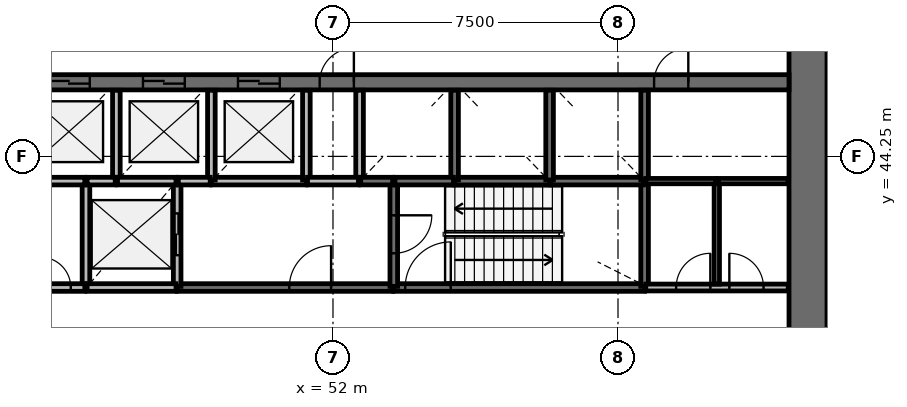
"""IFC4 building model, lengths in metres.
Left out: names, types, materials, properties, quantities, classifications, styles, units other than length and angle.
Written with IfcOpenShell. Run it as: python <this file> out.ifc"""

import sys

from ifc_helpers import new_model, si_unit, direction, frame, frame_2d, origin, place, context, subcontext, project, spatial, rectangle, extrude, source, transform, mapped, element, fill, save


model = new_model("IFC4")
c1 = context("Model", 3, precision=1e-05, world=origin(), true_north=direction((0.0, 1.0)))
c2 = subcontext(c1, "Body", "Model", "MODEL_VIEW")
j1 = project(units=[si_unit("LENGTHUNIT", "METRE"), si_unit("PLANEANGLEUNIT", "RADIAN")], contexts=[c1])
p1 = place(None, origin())
s1 = spatial("IfcSite", under=j1, at=p1, CompositionType="ELEMENT")
p2 = place(p1, origin())
s2 = spatial("IfcBuilding", under=s1, at=p2, CompositionType="ELEMENT")
p3 = place(p2, frame((0.0, 0.0, 9.4)))
s3 = spatial("IfcBuildingStorey", under=s2, at=p3, CompositionType="ELEMENT", Elevation=9.4)
p4 = place(p3, frame((64.5, 38.0, 0.0), z_axis=(0.0, 0.0, 1.0), x_axis=(0.0, 1.0, 0.0)))
e1 = element("IfcWall", 1, at=p4, inside=s3, PredefinedType="SHEAR", context=c2, shape_type="SweptSolid", body=[
    extrude(rectangle(XDim=20.0, YDim=1.0, at=frame_2d((10.0, 0.0))), origin(), (0.0, 0.0, 1.0), 4.4),
])
p5 = place(p4, frame((9.1, 0.0, 0.0)))
e2 = element("IfcOpeningElement", 2, at=p5, cuts=e1, PredefinedType="OPENING", context=c2, shape_type="SweptSolid", body=[
    extrude(rectangle(XDim=1.8, YDim=2.1, at=frame_2d((0.9, 1.05))), frame((0.0, 0.51, 0.0), z_axis=(0.0, -1.0, 0.0), x_axis=(1.0, 0.0, 0.0)), (0.0, 0.0, 1.0), 1.02),
])
p6 = place(p3, frame((40.0, 46.2, 0.0), z_axis=(0.0, 0.0, 1.0), x_axis=(1.0, 0.0, 0.0)))
e3 = element("IfcWall", 3, at=p6, inside=s3, PredefinedType="SHEAR", context=c2, shape_type="SweptSolid", body=[
    extrude(rectangle(XDim=24.0, YDim=0.4, at=frame_2d((12.0, 0.0))), origin(), (0.0, 0.0, 1.0), 4.4),
])
p7 = place(p6, frame((4.5, 0.0, 0.0)))
e4 = element("IfcOpeningElement", 4, at=p7, cuts=e3, PredefinedType="OPENING", context=c2, shape_type="SweptSolid", body=[
    extrude(rectangle(XDim=1.1, YDim=2.1, at=frame_2d((0.55, 1.05))), frame((0.0, 0.21, 0.0), z_axis=(0.0, -1.0, 0.0), x_axis=(1.0, 0.0, 0.0)), (0.0, 0.0, 1.0), 0.42),
])
p8 = place(p6, frame((7.0, 0.0, 0.0)))
e5 = element("IfcOpeningElement", 5, at=p8, cuts=e3, PredefinedType="OPENING", context=c2, shape_type="SweptSolid", body=[
    extrude(rectangle(XDim=1.1, YDim=2.1, at=frame_2d((0.55, 1.05))), frame((0.0, 0.21, 0.0), z_axis=(0.0, -1.0, 0.0), x_axis=(1.0, 0.0, 0.0)), (0.0, 0.0, 1.0), 0.42),
])
p9 = place(p6, frame((9.5, 0.0, 0.0)))
e6 = element("IfcOpeningElement", 6, at=p9, cuts=e3, PredefinedType="OPENING", context=c2, shape_type="SweptSolid", body=[
    extrude(rectangle(XDim=1.1, YDim=2.1, at=frame_2d((0.55, 1.05))), frame((0.0, 0.21, 0.0), z_axis=(0.0, -1.0, 0.0), x_axis=(1.0, 0.0, 0.0)), (0.0, 0.0, 1.0), 0.42),
])
p10 = place(p6, frame((20.45, 0.0, 0.0)))
e7 = element("IfcOpeningElement", 7, at=p10, cuts=e3, PredefinedType="OPENING", context=c2, shape_type="SweptSolid", body=[
    extrude(rectangle(XDim=0.9, YDim=2.1, at=frame_2d((0.45, 1.05))), frame((0.0, 0.21, 0.0), z_axis=(0.0, -1.0, 0.0), x_axis=(1.0, 0.0, 0.0)), (0.0, 0.0, 1.0), 0.42),
])
p11 = place(p6, frame((2.65, 0.0, 0.0)))
e8 = element("IfcOpeningElement", 8, at=p11, cuts=e3, PredefinedType="OPENING", context=c2, shape_type="SweptSolid", body=[
    extrude(rectangle(XDim=0.9, YDim=2.1, at=frame_2d((0.45, 1.05))), frame((0.0, 0.21, 0.0), z_axis=(0.0, -1.0, 0.0), x_axis=(1.0, 0.0, 0.0)), (0.0, 0.0, 1.0), 0.42),
])
p12 = place(p6, frame((11.65, 0.0, 0.0)))
e9 = element("IfcOpeningElement", 9, at=p12, cuts=e3, PredefinedType="OPENING", context=c2, shape_type="SweptSolid", body=[
    extrude(rectangle(XDim=0.9, YDim=2.1, at=frame_2d((0.45, 1.05))), frame((0.0, 0.21, 0.0), z_axis=(0.0, -1.0, 0.0), x_axis=(1.0, 0.0, 0.0)), (0.0, 0.0, 1.0), 0.42),
])
p13 = place(p3, frame((53.6, 40.8, 0.0), z_axis=(0.0, 0.0, 1.0), x_axis=(1.0, 0.0, 0.0)))
e10 = element("IfcWall", 10, at=p13, inside=s3, PredefinedType="SOLIDWALL", context=c2, shape_type="SweptSolid", body=[
    extrude(rectangle(XDim=6.6, YDim=0.2, at=frame_2d((3.3, 0.0))), origin(), (0.0, 0.0, 1.0), 3.95),
])
p14 = place(p13, frame((0.3, 0.0, 0.0)))
e11 = element("IfcOpeningElement", 11, at=p14, cuts=e10, PredefinedType="OPENING", context=c2, shape_type="SweptSolid", body=[
    extrude(rectangle(XDim=1.2, YDim=2.1, at=frame_2d((0.6, 1.05))), frame((0.0, 0.11, 0.0), z_axis=(0.0, -1.0, 0.0), x_axis=(1.0, 0.0, 0.0)), (0.0, 0.0, 1.0), 0.22),
])
p15 = place(p3, frame((47.9, 40.8, 0.0), z_axis=(0.0, 0.0, 1.0), x_axis=(1.0, 0.0, 0.0)))
e12 = element("IfcWall", 12, at=p15, inside=s3, PredefinedType="SOLIDWALL", context=c2, shape_type="SweptSolid", body=[
    extrude(rectangle(XDim=5.67, YDim=0.2, at=frame_2d((2.835, 0.0))), origin(), (0.0, 0.0, 1.0), 3.95),
])
p16 = place(p15, frame((2.95, 0.0, 0.0)))
e13 = element("IfcOpeningElement", 13, at=p16, cuts=e12, PredefinedType="OPENING", context=c2, shape_type="SweptSolid", body=[
    extrude(rectangle(XDim=1.1, YDim=2.1, at=frame_2d((0.55, 1.05))), frame((0.0, 0.11, 0.0), z_axis=(0.0, -1.0, 0.0), x_axis=(1.0, 0.0, 0.0)), (0.0, 0.0, 1.0), 0.22),
])
p17 = place(p3, frame((45.5, 43.6, 0.0), z_axis=(0.0, 0.0, 1.0), x_axis=(0.0, -1.0, 0.0)))
e14 = element("IfcWall", 14, at=p17, inside=s3, PredefinedType="SOLIDWALL", context=c2, shape_type="SweptSolid", body=[
    extrude(rectangle(XDim=2.8, YDim=0.2, at=frame_2d((1.4, 0.0))), origin(), (0.0, 0.0, 1.0), 3.95),
])
p18 = place(p3, frame((47.9, 40.83, 0.0), z_axis=(0.0, 0.0, 1.0), x_axis=(0.0, 1.0, 0.0)))
e15 = element("IfcWall", 15, at=p18, inside=s3, PredefinedType="SOLIDWALL", context=c2, shape_type="SweptSolid", body=[
    extrude(rectangle(XDim=2.77, YDim=0.2, at=frame_2d((1.385, 0.0))), origin(), (0.0, 0.0, 1.0), 3.95),
])
p19 = place(p18, frame((0.82, 0.0, 0.0)))
e16 = element("IfcOpeningElement", 16, at=p19, cuts=e15, PredefinedType="OPENING", context=c2, shape_type="SweptSolid", body=[
    extrude(rectangle(XDim=1.1, YDim=2.1, at=frame_2d((0.55, 1.05))), frame((0.0, 0.11, 0.0), z_axis=(0.0, -1.0, 0.0), x_axis=(1.0, 0.0, 0.0)), (0.0, 0.0, 1.0), 0.22),
])
p20 = place(p3, frame((60.2, 40.83, 0.0), z_axis=(0.0, 0.0, 1.0), x_axis=(0.0, 1.0, 0.0)))
e17 = element("IfcWall", 17, at=p20, inside=s3, PredefinedType="SOLIDWALL", context=c2, shape_type="SweptSolid", body=[
    extrude(rectangle(XDim=2.77, YDim=0.2, at=frame_2d((1.385, 0.0))), origin(), (0.0, 0.0, 1.0), 3.95),
])
p21 = place(p3, frame((53.6, 43.6, 0.0), z_axis=(0.0, 0.0, 1.0), x_axis=(0.0, -1.0, 0.0)))
e18 = element("IfcWall", 18, at=p21, inside=s3, PredefinedType="SOLIDWALL", context=c2, shape_type="SweptSolid", body=[
    extrude(rectangle(XDim=2.77, YDim=0.2, at=frame_2d((1.385, 0.0))), origin(), (0.0, 0.0, 1.0), 3.95),
])
p22 = place(p21, frame((0.9, 0.0, 0.0)))
e19 = element("IfcOpeningElement", 19, at=p22, cuts=e18, PredefinedType="OPENING", context=c2, shape_type="SweptSolid", body=[
    extrude(rectangle(XDim=1.0, YDim=2.1, at=frame_2d((0.5, 1.05))), frame((0.0, 0.11, 0.0), z_axis=(0.0, -1.0, 0.0), x_axis=(1.0, 0.0, 0.0)), (0.0, 0.0, 1.0), 0.22),
])
for number, where, z_axis, x_axis in (
    (20, (48.8, 43.6, 0.0), (0.0, 0.0, 1.0), (1.0, 0.0, 0.0)),
    (21, (55.2, 43.6, 0.0), (0.0, 0.0, 1.0), (1.0, 0.0, 0.0)),
):
    element("IfcWall", number, at=place(p3, frame(where, z_axis=z_axis, x_axis=x_axis)), inside=s3, PredefinedType="SOLIDWALL", context=c2, shape_type="SweptSolid", body=[
        extrude(rectangle(XDim=2.5, YDim=0.2, at=frame_2d((1.25, 0.0))), origin(), (0.0, 0.0, 1.0), 3.95),
    ])
p23 = place(p3, frame((57.73, 43.6, 0.0), z_axis=(0.0, 0.0, 1.0), x_axis=(1.0, 0.0, 0.0)))
e22 = element("IfcWall", 22, at=p23, inside=s3, PredefinedType="SOLIDWALL", context=c2, shape_type="SweptSolid", body=[
    extrude(rectangle(XDim=2.44, YDim=0.2, at=frame_2d((1.22, 0.0))), origin(), (0.0, 0.0, 1.0), 3.95),
])
p24 = place(p3, frame((45.53, 40.8, 0.0), z_axis=(0.0, 0.0, 1.0), x_axis=(1.0, 0.0, 0.0)))
e23 = element("IfcWall", 23, at=p24, inside=s3, PredefinedType="SOLIDWALL", context=c2, shape_type="SweptSolid", body=[
    extrude(rectangle(XDim=2.34, YDim=0.2, at=frame_2d((1.17, 0.0))), origin(), (0.0, 0.0, 1.0), 3.95),
])
p25 = place(p3, frame((46.3, 43.6, 0.0), z_axis=(0.0, 0.0, 1.0), x_axis=(0.0, 1.0, 0.0)))
e24 = element("IfcWall", 24, at=p25, inside=s3, PredefinedType="SOLIDWALL", context=c2, shape_type="SweptSolid", body=[
    extrude(rectangle(XDim=2.39, YDim=0.2, at=frame_2d((1.195, 0.0))), origin(), (0.0, 0.0, 1.0), 3.95),
])
for number, where, z_axis, x_axis in (
    (25, (48.8, 43.63, 0.0), (0.0, 0.0, 1.0), (0.0, 1.0, 0.0)),
    (26, (51.3, 43.63, 0.0), (0.0, 0.0, 1.0), (0.0, 1.0, 0.0)),
):
    element("IfcWall", number, at=place(p3, frame(where, z_axis=z_axis, x_axis=x_axis)), inside=s3, PredefinedType="SOLIDWALL", context=c2, shape_type="SweptSolid", body=[
        extrude(rectangle(XDim=2.36, YDim=0.2, at=frame_2d((1.18, 0.0))), origin(), (0.0, 0.0, 1.0), 3.95),
    ])
p26 = place(p3, frame((52.7, 45.99, 0.0), z_axis=(0.0, 0.0, 1.0), x_axis=(0.0, -1.0, 0.0)))
e27 = element("IfcWall", 27, at=p26, inside=s3, PredefinedType="SOLIDWALL", context=c2, shape_type="SweptSolid", body=[
    extrude(rectangle(XDim=2.39, YDim=0.2, at=frame_2d((1.195, 0.0))), origin(), (0.0, 0.0, 1.0), 3.95),
])
for number, where, z_axis, x_axis in (
    (28, (55.2, 43.63, 0.0), (0.0, 0.0, 1.0), (0.0, 1.0, 0.0)),
    (29, (57.7, 43.63, 0.0), (0.0, 0.0, 1.0), (0.0, 1.0, 0.0)),
    (30, (60.2, 43.63, 0.0), (0.0, 0.0, 1.0), (0.0, 1.0, 0.0)),
):
    element("IfcWall", number, at=place(p3, frame(where, z_axis=z_axis, x_axis=x_axis)), inside=s3, PredefinedType="SOLIDWALL", context=c2, shape_type="SweptSolid", body=[
        extrude(rectangle(XDim=2.36, YDim=0.2, at=frame_2d((1.18, 0.0))), origin(), (0.0, 0.0, 1.0), 3.95),
    ])
p27 = place(p3, frame((43.83, 43.6, 0.0), z_axis=(0.0, 0.0, 1.0), x_axis=(1.0, 0.0, 0.0)))
e31 = element("IfcWall", 31, at=p27, inside=s3, PredefinedType="SOLIDWALL", context=c2, shape_type="SweptSolid", body=[
    extrude(rectangle(XDim=1.64, YDim=0.2, at=frame_2d((0.82, 0.0))), origin(), (0.0, 0.0, 1.0), 3.95),
])
p28 = place(p3, frame((43.83, 40.8, 0.0), z_axis=(0.0, 0.0, 1.0), x_axis=(1.0, 0.0, 0.0)))
e32 = element("IfcWall", 32, at=p28, inside=s3, PredefinedType="SOLIDWALL", context=c2, shape_type="SweptSolid", body=[
    extrude(rectangle(XDim=1.64, YDim=0.2, at=frame_2d((0.82, 0.0))), origin(), (0.0, 0.0, 1.0), 3.95),
])
p29 = place(p28, frame((0.47, 0.0, 0.0)))
e33 = element("IfcOpeningElement", 33, at=p29, cuts=e32, PredefinedType="OPENING", context=c2, shape_type="SweptSolid", body=[
    extrude(rectangle(XDim=0.8, YDim=2.1, at=frame_2d((0.4, 1.05))), frame((0.0, 0.11, 0.0), z_axis=(0.0, -1.0, 0.0), x_axis=(1.0, 0.0, 0.0)), (0.0, 0.0, 1.0), 0.22),
])
for number, where, z_axis, x_axis in (
    (34, (46.33, 43.6, 0.0), (0.0, 0.0, 1.0), (1.0, 0.0, 0.0)),
    (35, (53.63, 43.6, 0.0), (0.0, 0.0, 1.0), (1.0, 0.0, 0.0)),
):
    element("IfcWall", number, at=place(p3, frame(where, z_axis=z_axis, x_axis=x_axis)), inside=s3, PredefinedType="SOLIDWALL", context=c2, shape_type="SweptSolid", body=[
        extrude(rectangle(XDim=1.54, YDim=0.2, at=frame_2d((0.77, 0.0))), origin(), (0.0, 0.0, 1.0), 3.95),
    ])
p30 = place(p3, frame((52.67, 43.6, 0.0), z_axis=(0.0, 0.0, 1.0), x_axis=(-1.0, 0.0, 0.0)))
e36 = element("IfcWall", 36, at=p30, inside=s3, PredefinedType="SOLIDWALL", context=c2, shape_type="SweptSolid", body=[
    extrude(rectangle(XDim=1.34, YDim=0.2, at=frame_2d((0.67, 0.0))), origin(), (0.0, 0.0, 1.0), 3.95),
])
for number, where, z_axis, x_axis in (
    (37, (47.93, 43.6, 0.0), (0.0, 0.0, 1.0), (1.0, 0.0, 0.0)),
    (38, (52.73, 43.6, 0.0), (0.0, 0.0, 1.0), (1.0, 0.0, 0.0)),
):
    element("IfcWall", number, at=place(p3, frame(where, z_axis=z_axis, x_axis=x_axis)), inside=s3, PredefinedType="SOLIDWALL", context=c2, shape_type="SweptSolid", body=[
        extrude(rectangle(XDim=0.84, YDim=0.2, at=frame_2d((0.42, 0.0))), origin(), (0.0, 0.0, 1.0), 3.95),
    ])
p31 = place(p3, frame((45.53, 43.6, 0.0), z_axis=(0.0, 0.0, 1.0), x_axis=(1.0, 0.0, 0.0)))
e39 = element("IfcWall", 39, at=p31, inside=s3, PredefinedType="SOLIDWALL", context=c2, shape_type="SweptSolid", body=[
    extrude(rectangle(XDim=0.74, YDim=0.2, at=frame_2d((0.37, 0.0))), origin(), (0.0, 0.0, 1.0), 3.95),
])
p32 = place(p3, frame((60.23, 40.8, 0.0), z_axis=(0.0, 0.0, 1.0), x_axis=(1.0, 0.0, 0.0)))
e40 = element("IfcWall", 40, at=p32, inside=s3, PredefinedType="PARTITIONING", context=c2, shape_type="SweptSolid", body=[
    extrude(rectangle(XDim=3.75, YDim=0.18, at=frame_2d((1.875, 0.0))), origin(), (0.0, 0.0, 1.0), 3.95),
])
p33 = place(p32, frame((0.8, 0.0, 0.0)))
e41 = element("IfcOpeningElement", 41, at=p33, cuts=e40, PredefinedType="OPENING", context=c2, shape_type="SweptSolid", body=[
    extrude(rectangle(XDim=0.9, YDim=2.1, at=frame_2d((0.45, 1.05))), frame((0.0, 0.1, 0.0), z_axis=(0.0, -1.0, 0.0), x_axis=(1.0, 0.0, 0.0)), (0.0, 0.0, 1.0), 0.2),
])
p34 = place(p32, frame((2.2, 0.0, 0.0)))
e42 = element("IfcOpeningElement", 42, at=p34, cuts=e40, PredefinedType="OPENING", context=c2, shape_type="SweptSolid", body=[
    extrude(rectangle(XDim=0.9, YDim=2.1, at=frame_2d((0.45, 1.05))), frame((0.0, 0.1, 0.0), z_axis=(0.0, -1.0, 0.0), x_axis=(1.0, 0.0, 0.0)), (0.0, 0.0, 1.0), 0.2),
])
p35 = place(p3, frame((62.1, 40.89, 0.0), z_axis=(0.0, 0.0, 1.0), x_axis=(0.0, 1.0, 0.0)))
e43 = element("IfcWall", 43, at=p35, inside=s3, PredefinedType="PARTITIONING", context=c2, shape_type="SweptSolid", body=[
    extrude(rectangle(XDim=2.71, YDim=0.14, at=frame_2d((1.355, 0.0))), origin(), (0.0, 0.0, 1.0), 3.15),
])
p36 = place(p3, frame((60.23, 43.6, 0.0), z_axis=(0.0, 0.0, 1.0), x_axis=(1.0, 0.0, 0.0)))
e44 = element("IfcWall", 44, at=p36, inside=s3, PredefinedType="PARTITIONING", context=c2, shape_type="SweptSolid", body=[
    extrude(rectangle(XDim=1.84, YDim=0.14, at=frame_2d((0.92, 0.0))), origin(), (0.0, 0.0, 1.0), 3.15),
])
p37 = place(p3, frame((62.13, 43.6, 0.0), z_axis=(0.0, 0.0, 1.0), x_axis=(1.0, 0.0, 0.0)))
e45 = element("IfcWall", 45, at=p37, inside=s3, PredefinedType="PARTITIONING", context=c2, shape_type="SweptSolid", body=[
    extrude(rectangle(XDim=1.85, YDim=0.14, at=frame_2d((0.925, 0.0))), origin(), (0.0, 0.0, 1.0), 3.15),
])
m1 = source(origin(), c2, "Body", "SweptSolid", [
    extrude(rectangle(XDim=1.1, YDim=2.1, at=frame_2d((0.55, 1.05))), frame((0.0, 0.025, 0.0), z_axis=(0.0, -1.0, 0.0), x_axis=(1.0, 0.0, 0.0)), (0.0, 0.0, 1.0), 0.05),
])
p38 = place(p7, origin())
e46 = element("IfcDoor", 46, at=p38, inside=s3, OperationType="DOUBLE_DOOR_SLIDING", PredefinedType="USERDEFINED", context=c2, shape_type="MappedRepresentation", body=[
    mapped(m1, transform((0.0, 0.0, 0.0), scale=1.0)),
])
fill(e4, e46)
p39 = place(p8, origin())
e47 = element("IfcDoor", 47, at=p39, inside=s3, OperationType="DOUBLE_DOOR_SLIDING", PredefinedType="USERDEFINED", context=c2, shape_type="MappedRepresentation", body=[
    mapped(m1, transform((0.0, 0.0, 0.0), scale=1.0)),
])
fill(e5, e47)
p40 = place(p9, origin())
e48 = element("IfcDoor", 48, at=p40, inside=s3, OperationType="DOUBLE_DOOR_SLIDING", PredefinedType="USERDEFINED", context=c2, shape_type="MappedRepresentation", body=[
    mapped(m1, transform((0.0, 0.0, 0.0), scale=1.0)),
])
fill(e6, e48)
p41 = place(p19, origin())
e49 = element("IfcDoor", 49, at=p41, inside=s3, OperationType="DOUBLE_DOOR_SLIDING", PredefinedType="USERDEFINED", context=c2, shape_type="MappedRepresentation", body=[
    mapped(m1, transform((0.0, 0.0, 0.0), scale=1.0)),
])
fill(e16, e49)
m2 = source(origin(), c2, "Body", "SweptSolid", [
    extrude(rectangle(XDim=1.2, YDim=2.1, at=frame_2d((0.6, 1.05))), frame((0.0, 0.025, 0.0), z_axis=(0.0, -1.0, 0.0), x_axis=(1.0, 0.0, 0.0)), (0.0, 0.0, 1.0), 0.05),
])
p42 = place(p14, origin())
e50 = element("IfcDoor", 50, at=p42, inside=s3, OperationType="SINGLE_SWING_RIGHT", PredefinedType="DOOR", context=c2, shape_type="MappedRepresentation", body=[
    mapped(m2, transform((0.0, 0.0, 0.0), scale=1.0)),
])
fill(e11, e50)
m3 = source(origin(), c2, "Body", "SweptSolid", [
    extrude(rectangle(XDim=1.0, YDim=2.1, at=frame_2d((0.5, 1.05))), frame((0.0, 0.025, 0.0), z_axis=(0.0, -1.0, 0.0), x_axis=(1.0, 0.0, 0.0)), (0.0, 0.0, 1.0), 0.05),
])
p43 = place(p22, origin())
e51 = element("IfcDoor", 51, at=p43, inside=s3, OperationType="SINGLE_SWING_LEFT", PredefinedType="DOOR", context=c2, shape_type="MappedRepresentation", body=[
    mapped(m3, transform((0.0, 0.0, 0.0), scale=1.0)),
])
fill(e19, e51)
m4 = source(origin(), c2, "Body", "SweptSolid", [
    extrude(rectangle(XDim=1.1, YDim=2.1, at=frame_2d((0.55, 1.05))), frame((0.0, 0.025, 0.0), z_axis=(0.0, -1.0, 0.0), x_axis=(1.0, 0.0, 0.0)), (0.0, 0.0, 1.0), 0.05),
])
p44 = place(p16, origin())
e52 = element("IfcDoor", 52, at=p44, inside=s3, OperationType="SINGLE_SWING_RIGHT", PredefinedType="DOOR", context=c2, shape_type="MappedRepresentation", body=[
    mapped(m4, transform((0.0, 0.0, 0.0), scale=1.0)),
])
fill(e13, e52)
m5 = source(origin(), c2, "Body", "SweptSolid", [
    extrude(rectangle(XDim=0.8, YDim=2.1, at=frame_2d((0.4, 1.05))), frame((0.0, 0.025, 0.0), z_axis=(0.0, -1.0, 0.0), x_axis=(1.0, 0.0, 0.0)), (0.0, 0.0, 1.0), 0.05),
])
p45 = place(p29, origin())
e53 = element("IfcDoor", 53, at=p45, inside=s3, OperationType="SINGLE_SWING_LEFT", PredefinedType="DOOR", context=c2, shape_type="MappedRepresentation", body=[
    mapped(m5, transform((0.0, 0.0, 0.0), scale=1.0)),
])
fill(e33, e53)
m6 = source(origin(), c2, "Body", "SweptSolid", [
    extrude(rectangle(XDim=0.9, YDim=2.1, at=frame_2d((0.45, 1.05))), frame((0.0, 0.025, 0.0), z_axis=(0.0, -1.0, 0.0), x_axis=(1.0, 0.0, 0.0)), (0.0, 0.0, 1.0), 0.05),
])
p46 = place(p10, origin())
e54 = element("IfcDoor", 54, at=p46, inside=s3, OperationType="SINGLE_SWING_RIGHT", PredefinedType="DOOR", context=c2, shape_type="MappedRepresentation", body=[
    mapped(m6, transform((0.0, 0.0, 0.0), scale=1.0)),
])
fill(e7, e54)
p47 = place(p33, origin())
e55 = element("IfcDoor", 55, at=p47, inside=s3, OperationType="SINGLE_SWING_RIGHT", PredefinedType="DOOR", context=c2, shape_type="MappedRepresentation", body=[
    mapped(m6, transform((0.0, 0.0, 0.0), scale=1.0)),
])
fill(e41, e55)
p48 = place(p34, origin())
e56 = element("IfcDoor", 56, at=p48, inside=s3, OperationType="SINGLE_SWING_LEFT", PredefinedType="DOOR", context=c2, shape_type="MappedRepresentation", body=[
    mapped(m6, transform((0.0, 0.0, 0.0), scale=1.0)),
])
fill(e42, e56)
p49 = place(p12, origin())
e57 = element("IfcDoor", 57, at=p49, inside=s3, OperationType="SINGLE_SWING_RIGHT", PredefinedType="DOOR", context=c2, shape_type="MappedRepresentation", body=[
    mapped(m6, transform((0.0, 0.0, 0.0), scale=1.0)),
])
fill(e9, e57)
save(model, sys.argv[1])
